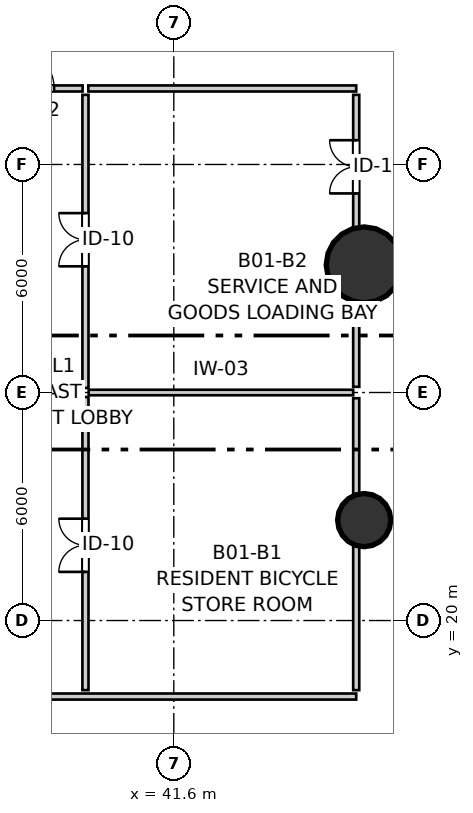
"""IFC4 building model, lengths in metres.
Left out: names, types, materials, properties, quantities, classifications, styles, units other than length and angle.
Written with IfcOpenShell. Run it as: python <this file> out.ifc"""

import sys

from ifc_helpers import new_model, si_unit, direction, frame, frame_2d, origin, origin_2d, place, context, subcontext, project, spatial, rectangle, circle, extrude, source, transform, mapped, element, fill, save


model = new_model("IFC4")
c1 = context("Model", 3, precision=1e-05, world=origin(), true_north=direction((0.0, 1.0)))
c2 = subcontext(c1, "Body", "Model", "MODEL_VIEW")
j1 = project(units=[si_unit("LENGTHUNIT", "METRE"), si_unit("PLANEANGLEUNIT", "RADIAN")], contexts=[c1])
p1 = place(None, origin())
s1 = spatial("IfcSite", under=j1, at=p1, CompositionType="ELEMENT")
p2 = place(p1, origin())
s2 = spatial("IfcBuilding", under=s1, at=p2, CompositionType="ELEMENT")
p3 = place(p2, frame((0.0, 0.0, -4.2)))
s3 = spatial("IfcBuildingStorey", under=s2, at=p3, CompositionType="ELEMENT", Elevation=-4.2)
m1 = source(origin(), c2, "Body", "SweptSolid", [
    extrude(circle(Radius=1.0, at=origin_2d()), origin(), (0.0, 0.0, 1.0), 4.195),
])
p4 = place(p3, frame((46.61, 29.357, 0.0), z_axis=(0.0, 0.0, 1.0), x_axis=(1.0, 0.0, 0.0)))
e1 = element("IfcColumn", 1, at=p4, inside=s3, PredefinedType="COLUMN", context=c2, shape_type="MappedRepresentation", body=[
    mapped(m1, transform((0.0, 0.0, 0.0), x_axis=(1.0, 0.0, 0.0), y_axis=(0.0, 1.0, 0.0), z_axis=(0.0, 0.0, 1.0), scale=1.0)),
])
m2 = source(origin(), c2, "Body", "SweptSolid", [
    extrude(circle(Radius=0.7, at=origin_2d()), origin(), (0.0, 0.0, 1.0), 4.157),
])
p5 = place(p3, frame((46.61, 22.643, 0.0), z_axis=(0.0, 0.0, 1.0), x_axis=(1.0, 0.0, 0.0)))
e2 = element("IfcColumn", 2, at=p5, inside=s3, PredefinedType="COLUMN", context=c2, shape_type="MappedRepresentation", body=[
    mapped(m2, transform((0.0, 0.0, 0.0), x_axis=(1.0, 0.0, 0.0), y_axis=(0.0, 1.0, 0.0), z_axis=(0.0, 0.0, 1.0), scale=1.0)),
])
p6 = place(p3, frame((36.7, 18.0, 0.0), z_axis=(0.0, 0.0, 1.0), x_axis=(1.0, 0.0, 0.0)))
e3 = element("IfcWall", 3, at=p6, inside=s3, PredefinedType="PARTITIONING", context=c2, shape_type="SweptSolid", body=[
    extrude(rectangle(XDim=9.7, YDim=0.16, at=frame_2d((4.85, 0.0))), origin(), (0.0, 0.0, 1.0), 3.9),
])
p7 = place(p3, frame((36.7, 34.0, 0.0), z_axis=(0.0, 0.0, 1.0), x_axis=(1.0, 0.0, 0.0)))
e4 = element("IfcWall", 4, at=p7, inside=s3, PredefinedType="PARTITIONING", context=c2, shape_type="SweptSolid", body=[
    extrude(rectangle(XDim=2.5, YDim=0.16, at=frame_2d((1.25, 0.0))), origin(), (0.0, 0.0, 1.0), 3.9),
])
p8 = place(p7, frame((0.65, 0.0, 0.0)))
e5 = element("IfcOpeningElement", 5, at=p8, cuts=e4, PredefinedType="OPENING", context=c2, shape_type="SweptSolid", body=[
    extrude(rectangle(XDim=1.1, YDim=2.15, at=frame_2d((0.55, 1.075))), frame((0.0, 0.09, 0.0), z_axis=(0.0, -1.0, 0.0), x_axis=(1.0, 0.0, 0.0)), (0.0, 0.0, 1.0), 0.18),
])
p9 = place(p3, frame((39.35, 34.0, 0.0), z_axis=(0.0, 0.0, 1.0), x_axis=(1.0, 0.0, 0.0)))
e6 = element("IfcWall", 6, at=p9, inside=s3, PredefinedType="PARTITIONING", context=c2, shape_type="SweptSolid", body=[
    extrude(rectangle(XDim=7.05, YDim=0.16, at=frame_2d((3.525, 0.0))), origin(), (0.0, 0.0, 1.0), 3.9),
])
p10 = place(p3, frame((39.275, 18.168, 0.0), z_axis=(0.0, 0.0, 1.0), x_axis=(0.0, 1.0, 0.0)))
e7 = element("IfcWall", 7, at=p10, inside=s3, PredefinedType="PARTITIONING", context=c2, shape_type="SweptSolid", body=[
    extrude(rectangle(XDim=7.712, YDim=0.16, at=frame_2d((3.856, 0.0))), origin(), (0.0, 0.0, 1.0), 3.9),
])
p11 = place(p10, frame((3.112, 0.0, 0.0)))
e8 = element("IfcOpeningElement", 8, at=p11, cuts=e7, PredefinedType="OPENING", context=c2, shape_type="SweptSolid", body=[
    extrude(rectangle(XDim=1.4, YDim=2.15, at=frame_2d((0.7, 1.075))), frame((0.0, 0.09, 0.0), z_axis=(0.0, -1.0, 0.0), x_axis=(1.0, 0.0, 0.0)), (0.0, 0.0, 1.0), 0.18),
])
p12 = place(p3, frame((39.275, 26.12, 0.0), z_axis=(0.0, 0.0, 1.0), x_axis=(0.0, 1.0, 0.0)))
e9 = element("IfcWall", 9, at=p12, inside=s3, PredefinedType="PARTITIONING", context=c2, shape_type="SweptSolid", body=[
    extrude(rectangle(XDim=7.712, YDim=0.16, at=frame_2d((3.856, 0.0))), origin(), (0.0, 0.0, 1.0), 3.9),
])
p13 = place(p12, frame((3.2, 0.0, 0.0)))
e10 = element("IfcOpeningElement", 10, at=p13, cuts=e9, PredefinedType="OPENING", context=c2, shape_type="SweptSolid", body=[
    extrude(rectangle(XDim=1.4, YDim=2.15, at=frame_2d((0.7, 1.075))), frame((0.0, 0.09, 0.0), z_axis=(0.0, -1.0, 0.0), x_axis=(1.0, 0.0, 0.0)), (0.0, 0.0, 1.0), 0.18),
])
p14 = place(p3, frame((39.36, 26.0, 0.0), z_axis=(0.0, 0.0, 1.0), x_axis=(1.0, 0.0, 0.0)))
e11 = element("IfcWall", 11, at=p14, inside=s3, PredefinedType="PARTITIONING", context=c2, shape_type="SweptSolid", body=[
    extrude(rectangle(XDim=6.96, YDim=0.145, at=frame_2d((3.48, 0.0))), origin(), (0.0, 0.0, 1.0), 3.9),
])
p15 = place(p3, frame((46.4, 18.168, 0.0), z_axis=(0.0, 0.0, 1.0), x_axis=(0.0, 1.0, 0.0)))
e12 = element("IfcWall", 12, at=p15, inside=s3, PredefinedType="PARTITIONING", context=c2, shape_type="SweptSolid", body=[
    extrude(rectangle(XDim=7.682, YDim=0.16, at=frame_2d((3.841, 0.0))), origin(), (0.0, 0.0, 1.0), 3.9),
])
p16 = place(p3, frame((46.4, 26.15, 0.0), z_axis=(0.0, 0.0, 1.0), x_axis=(0.0, 1.0, 0.0)))
e13 = element("IfcWall", 13, at=p16, inside=s3, PredefinedType="PARTITIONING", context=c2, shape_type="SweptSolid", body=[
    extrude(rectangle(XDim=7.682, YDim=0.16, at=frame_2d((3.841, 0.0))), origin(), (0.0, 0.0, 1.0), 3.9),
])
p17 = place(p16, frame((5.088, 0.0, 0.0)))
e14 = element("IfcOpeningElement", 14, at=p17, cuts=e13, PredefinedType="OPENING", context=c2, shape_type="SweptSolid", body=[
    extrude(rectangle(XDim=1.4, YDim=2.15, at=frame_2d((0.7, 1.075))), frame((0.0, 0.09, 0.0), z_axis=(0.0, -1.0, 0.0), x_axis=(1.0, 0.0, 0.0)), (0.0, 0.0, 1.0), 0.18),
])
m3 = source(origin(), c2, "Body", "SweptSolid", [
    extrude(rectangle(XDim=1.1, YDim=2.15, at=frame_2d((0.55, 1.075))), frame((0.0, 0.025, 0.0), z_axis=(0.0, -1.0, 0.0), x_axis=(1.0, 0.0, 0.0)), (0.0, 0.0, 1.0), 0.05),
])
p18 = place(p8, origin())
e15 = element("IfcDoor", 15, at=p18, inside=s3, OperationType="SINGLE_SWING_LEFT", PredefinedType="DOOR", context=c2, shape_type="MappedRepresentation", body=[
    mapped(m3, transform((0.0, 0.0, 0.0), x_axis=(1.0, 0.0, 0.0), y_axis=(0.0, 1.0, 0.0), z_axis=(0.0, 0.0, 1.0), scale=1.0)),
])
fill(e5, e15)
m4 = source(origin(), c2, "Body", "SweptSolid", [
    extrude(rectangle(XDim=1.4, YDim=2.15, at=frame_2d((0.7, 1.075))), frame((0.0, 0.025, 0.0), z_axis=(0.0, -1.0, 0.0), x_axis=(1.0, 0.0, 0.0)), (0.0, 0.0, 1.0), 0.05),
])
p19 = place(p11, origin())
e16 = element("IfcDoor", 16, at=p19, inside=s3, OperationType="DOUBLE_DOOR_SINGLE_SWING", PredefinedType="DOOR", context=c2, shape_type="MappedRepresentation", body=[
    mapped(m4, transform((0.0, 0.0, 0.0), x_axis=(1.0, 0.0, 0.0), y_axis=(0.0, 1.0, 0.0), z_axis=(0.0, 0.0, 1.0), scale=1.0)),
])
fill(e8, e16)
p20 = place(p13, origin())
e17 = element("IfcDoor", 17, at=p20, inside=s3, OperationType="DOUBLE_DOOR_SINGLE_SWING", PredefinedType="DOOR", context=c2, shape_type="MappedRepresentation", body=[
    mapped(m4, transform((0.0, 0.0, 0.0), x_axis=(1.0, 0.0, 0.0), y_axis=(0.0, 1.0, 0.0), z_axis=(0.0, 0.0, 1.0), scale=1.0)),
])
fill(e10, e17)
p21 = place(p17, origin())
e18 = element("IfcDoor", 18, at=p21, inside=s3, OperationType="DOUBLE_DOOR_SINGLE_SWING", PredefinedType="DOOR", context=c2, shape_type="MappedRepresentation", body=[
    mapped(m4, transform((0.0, 0.0, 0.0), x_axis=(1.0, 0.0, 0.0), y_axis=(0.0, 1.0, 0.0), z_axis=(0.0, 0.0, 1.0), scale=1.0)),
])
fill(e14, e18)
save(model, sys.argv[1])
